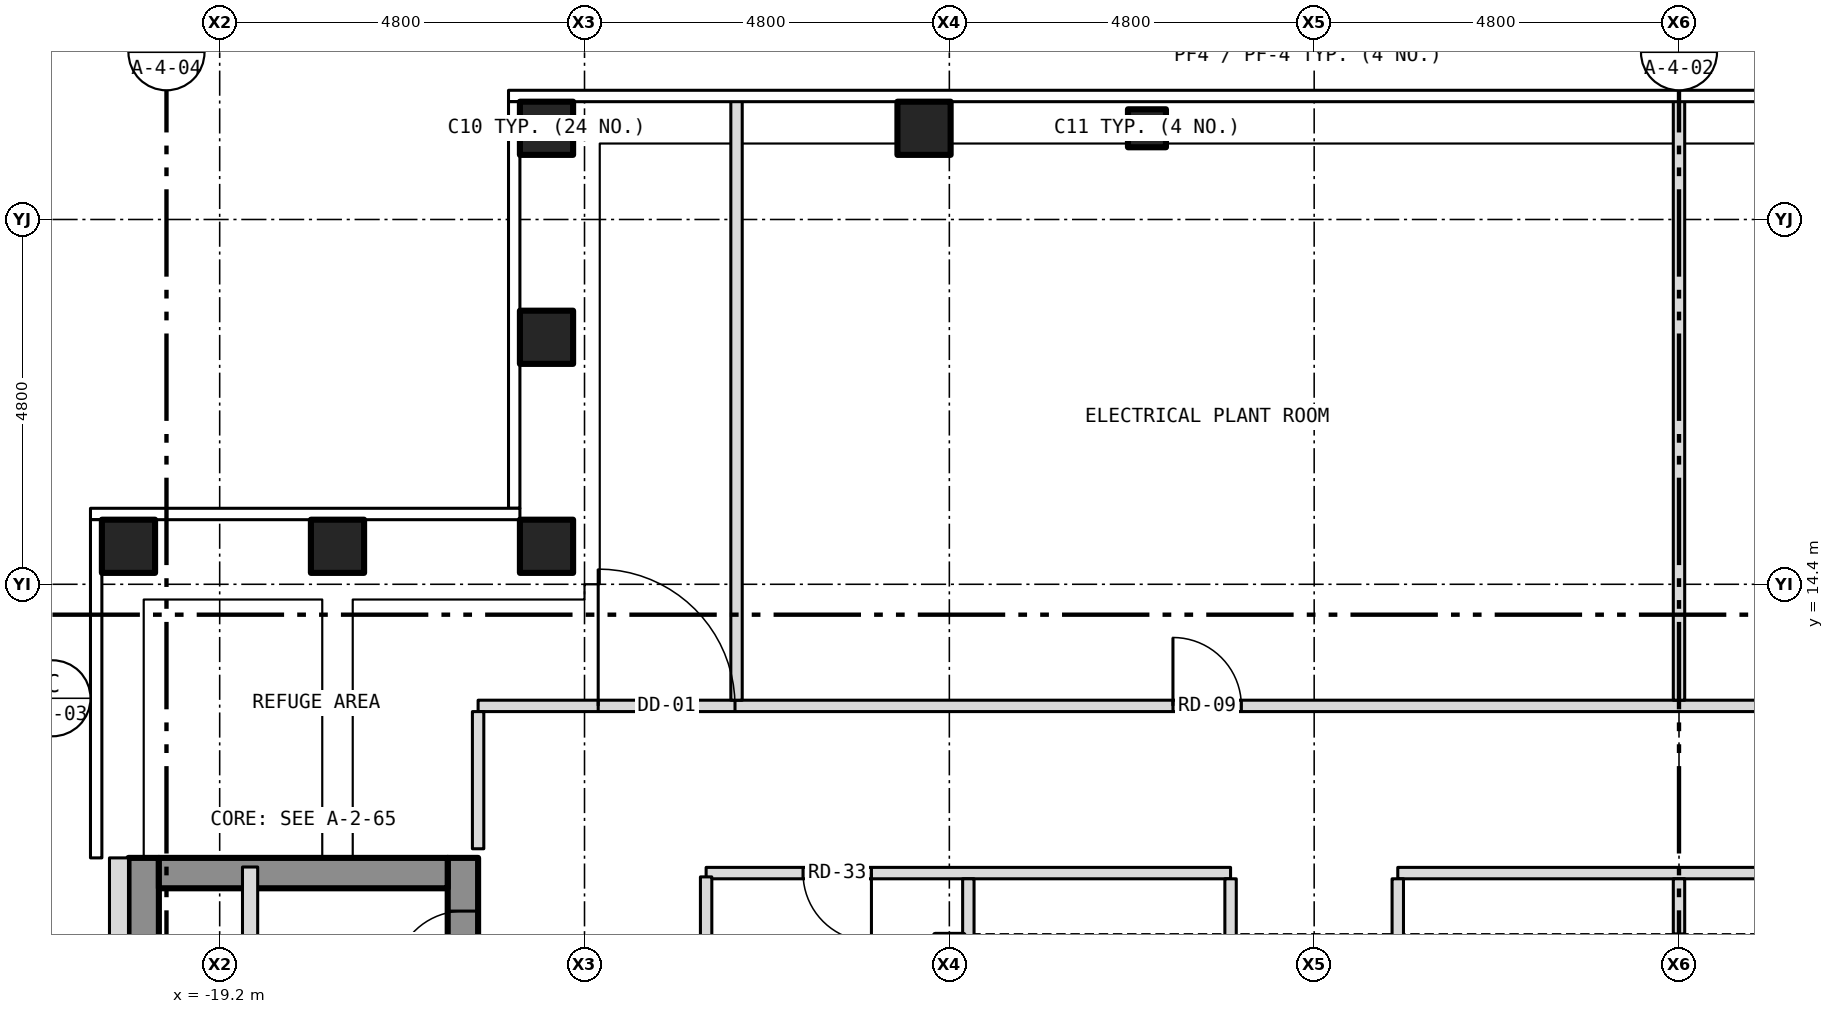
"""IFC4 building model, lengths in metres.
Left out: names, types, materials, properties, quantities, classifications, styles, units other than length and angle.
Written with IfcOpenShell. Run it as: python <this file> out.ifc"""

import sys

from ifc_helpers import new_model, si_unit, direction, frame, frame_2d, origin, origin_2d, place, context, subcontext, project, spatial, rectangle, hollow_rectangle, extrude, element, fill, save


model = new_model("IFC4")
c1 = context("Model", 3, precision=1e-05, world=origin(), true_north=direction((0.0, 1.0)))
c2 = subcontext(c1, "Body", "Model", "MODEL_VIEW")
j1 = project(units=[si_unit("LENGTHUNIT", "METRE"), si_unit("PLANEANGLEUNIT", "RADIAN")], contexts=[c1])
p1 = place(None, origin())
s1 = spatial("IfcSite", under=j1, at=p1, CompositionType="ELEMENT")
p2 = place(p1, origin())
s2 = spatial("IfcBuilding", under=s1, at=p2, CompositionType="ELEMENT")
p3 = place(p2, frame((0.0, 0.0, 236.5)))
s3 = spatial("IfcBuildingStorey", under=s2, at=p3, CompositionType="ELEMENT", Elevation=236.5)
for number, where, z_axis, x_axis in (
    (1, (-14.9, 20.4, -0.3), (0.0, 0.0, 1.0), (1.0, 0.0, 0.0)),
    (2, (-9.933, 20.4, -0.3), (0.0, 0.0, 1.0), (1.0, 0.0, 0.0)),
    (3, (-20.4, 14.9, -0.3), (0.0, 0.0, 1.0), (1.0, 0.0, 0.0)),
    (4, (-14.9, 14.9, -0.3), (0.0, 0.0, 1.0), (1.0, 0.0, 0.0)),
    (5, (-14.9, 17.65, -0.3), (0.0, 0.0, 1.0), (1.0, 0.0, 0.0)),
    (6, (-17.65, 14.9, -0.3), (0.0, 0.0, 1.0), (1.0, 0.0, 0.0)),
):
    element("IfcColumn", number, at=place(p3, frame(where, z_axis=z_axis, x_axis=x_axis)), inside=s3, PredefinedType="COLUMN", context=c2, shape_type="SweptSolid", body=[
        extrude(hollow_rectangle(XDim=0.7, YDim=0.7, WallThickness=0.04, at=origin_2d()), origin(), (0.0, 0.0, 1.0), 4.65),
    ])
p4 = place(p3, frame((-7.0, 20.4, -0.3), z_axis=(0.0, 0.0, 1.0), x_axis=(1.0, 0.0, 0.0)))
e7 = element("IfcColumn", 7, at=p4, inside=s3, PredefinedType="COLUMN", context=c2, shape_type="SweptSolid", body=[
    extrude(hollow_rectangle(XDim=0.5, YDim=0.5, WallThickness=0.03, at=origin_2d()), origin(), (0.0, 0.0, 1.0), 4.65),
])
p5 = place(p3, frame((-16.0, -10.8, 0.0), z_axis=(0.0, 0.0, 1.0), x_axis=(0.0, 1.0, 0.0)))
e8 = element("IfcWall", 8, at=p5, inside=s3, PredefinedType="SHEAR", context=c2, shape_type="SweptSolid", body=[
    extrude(rectangle(XDim=21.6, YDim=0.4, at=frame_2d((10.8, 0.0))), origin(), (0.0, 0.0, 1.0), 3.9),
])
p6 = place(p5, frame((9.4, 0.0, 0.0)))
e9 = element("IfcOpeningElement", 9, at=p6, cuts=e8, PredefinedType="OPENING", context=c2, shape_type="SweptSolid", body=[
    extrude(rectangle(XDim=1.1, YDim=2.1, at=frame_2d((0.55, 1.05))), frame((0.0, 0.212, 0.0), z_axis=(0.0, -1.0, 0.0), x_axis=(1.0, 0.0, 0.0)), (0.0, 0.0, 1.0), 0.424),
])
p7 = place(p5, frame((11.5, 0.0, 0.0)))
e10 = element("IfcOpeningElement", 10, at=p7, cuts=e8, PredefinedType="OPENING", context=c2, shape_type="SweptSolid", body=[
    extrude(rectangle(XDim=1.1, YDim=2.1, at=frame_2d((0.55, 1.05))), frame((0.0, 0.212, 0.0), z_axis=(0.0, -1.0, 0.0), x_axis=(1.0, 0.0, 0.0)), (0.0, 0.0, 1.0), 0.424),
])
p8 = place(p5, frame((13.6, 0.0, 0.0)))
e11 = element("IfcOpeningElement", 11, at=p8, cuts=e8, PredefinedType="OPENING", context=c2, shape_type="SweptSolid", body=[
    extrude(rectangle(XDim=1.1, YDim=2.1, at=frame_2d((0.55, 1.05))), frame((0.0, 0.212, 0.0), z_axis=(0.0, -1.0, 0.0), x_axis=(1.0, 0.0, 0.0)), (0.0, 0.0, 1.0), 0.424),
])
p9 = place(p5, frame((15.7, 0.0, 0.0)))
e12 = element("IfcOpeningElement", 12, at=p9, cuts=e8, PredefinedType="OPENING", context=c2, shape_type="SweptSolid", body=[
    extrude(rectangle(XDim=1.1, YDim=2.1, at=frame_2d((0.55, 1.05))), frame((0.0, 0.212, 0.0), z_axis=(0.0, -1.0, 0.0), x_axis=(1.0, 0.0, 0.0)), (0.0, 0.0, 1.0), 0.424),
])
p10 = place(p5, frame((17.8, 0.0, 0.0)))
e13 = element("IfcOpeningElement", 13, at=p10, cuts=e8, PredefinedType="OPENING", context=c2, shape_type="SweptSolid", body=[
    extrude(rectangle(XDim=1.1, YDim=2.1, at=frame_2d((0.55, 1.05))), frame((0.0, 0.212, 0.0), z_axis=(0.0, -1.0, 0.0), x_axis=(1.0, 0.0, 0.0)), (0.0, 0.0, 1.0), 0.424),
])
p11 = place(p5, frame((0.458, 0.0, 0.0)))
e14 = element("IfcOpeningElement", 14, at=p11, cuts=e8, PredefinedType="OPENING", context=c2, shape_type="SweptSolid", body=[
    extrude(rectangle(XDim=1.1, YDim=2.1, at=frame_2d((0.55, 1.05))), frame((0.0, 0.212, 0.0), z_axis=(0.0, -1.0, 0.0), x_axis=(1.0, 0.0, 0.0)), (0.0, 0.0, 1.0), 0.424),
])
p12 = place(p5, frame((7.5, 0.0, 0.0)))
e15 = element("IfcOpeningElement", 15, at=p12, cuts=e8, PredefinedType="OPENING", context=c2, shape_type="SweptSolid", body=[
    extrude(rectangle(XDim=1.1, YDim=2.1, at=frame_2d((0.55, 1.05))), frame((0.0, 0.212, 0.0), z_axis=(0.0, -1.0, 0.0), x_axis=(1.0, 0.0, 0.0)), (0.0, 0.0, 1.0), 0.424),
])
p13 = place(p5, frame((20.0, 0.0, 0.0)))
e16 = element("IfcOpeningElement", 16, at=p13, cuts=e8, PredefinedType="OPENING", context=c2, shape_type="SweptSolid", body=[
    extrude(rectangle(XDim=0.9, YDim=2.1, at=frame_2d((0.45, 1.05))), frame((0.0, 0.212, 0.0), z_axis=(0.0, -1.0, 0.0), x_axis=(1.0, 0.0, 0.0)), (0.0, 0.0, 1.0), 0.424),
])
p14 = place(p3, frame((-20.2, -10.8, 0.0), z_axis=(0.0, 0.0, 1.0), x_axis=(0.0, 1.0, 0.0)))
e17 = element("IfcWall", 17, at=p14, inside=s3, PredefinedType="SHEAR", context=c2, shape_type="SweptSolid", body=[
    extrude(rectangle(XDim=21.6, YDim=0.4, at=frame_2d((10.8, 0.0))), origin(), (0.0, 0.0, 1.0), 3.9),
])
p15 = place(p3, frame((-20.0, 10.6, 0.0), z_axis=(0.0, 0.0, 1.0), x_axis=(1.0, 0.0, 0.0)))
e18 = element("IfcWall", 18, at=p15, inside=s3, PredefinedType="SHEAR", context=c2, shape_type="SweptSolid", body=[
    extrude(rectangle(XDim=3.8, YDim=0.4, at=frame_2d((1.9, 0.0))), origin(), (0.0, 0.0, 1.0), 3.9),
])
p16 = place(p3, frame((-20.525, 10.8, 0.0), z_axis=(0.0, 0.0, 1.0), x_axis=(0.0, -1.0, 0.0)))
e19 = element("IfcWall", 19, at=p16, inside=s3, PredefinedType="SOLIDWALL", context=c2, shape_type="SweptSolid", body=[
    extrude(rectangle(XDim=21.6, YDim=0.25, at=frame_2d((10.8, 0.0))), origin(), (0.0, 0.0, 1.0), 4.5),
])
p17 = place(p16, frame((3.0, 0.0, 2.2)))
e20 = element("IfcOpeningElement", 20, at=p17, cuts=e19, PredefinedType="OPENING", context=c2, shape_type="SweptSolid", body=[
    extrude(rectangle(XDim=1.2, YDim=0.6, at=frame_2d((0.6, 0.3))), frame((0.0, 0.137, 0.0), z_axis=(0.0, -1.0, 0.0), x_axis=(1.0, 0.0, 0.0)), (0.0, 0.0, 1.0), 0.274),
])
p18 = place(p16, frame((7.8, 0.0, 2.2)))
e21 = element("IfcOpeningElement", 21, at=p18, cuts=e19, PredefinedType="OPENING", context=c2, shape_type="SweptSolid", body=[
    extrude(rectangle(XDim=1.2, YDim=0.6, at=frame_2d((0.6, 0.3))), frame((0.0, 0.137, 0.0), z_axis=(0.0, -1.0, 0.0), x_axis=(1.0, 0.0, 0.0)), (0.0, 0.0, 1.0), 0.274),
])
p19 = place(p16, frame((12.6, 0.0, 2.2)))
e22 = element("IfcOpeningElement", 22, at=p19, cuts=e19, PredefinedType="OPENING", context=c2, shape_type="SweptSolid", body=[
    extrude(rectangle(XDim=1.2, YDim=0.6, at=frame_2d((0.6, 0.3))), frame((0.0, 0.137, 0.0), z_axis=(0.0, -1.0, 0.0), x_axis=(1.0, 0.0, 0.0)), (0.0, 0.0, 1.0), 0.274),
])
p20 = place(p16, frame((17.4, 0.0, 2.2)))
e23 = element("IfcOpeningElement", 23, at=p20, cuts=e19, PredefinedType="OPENING", context=c2, shape_type="SweptSolid", body=[
    extrude(rectangle(XDim=1.2, YDim=0.6, at=frame_2d((0.6, 0.3))), frame((0.0, 0.137, 0.0), z_axis=(0.0, -1.0, 0.0), x_axis=(1.0, 0.0, 0.0)), (0.0, 0.0, 1.0), 0.274),
])
p21 = place(p3, frame((-12.8, 10.6, 0.0), z_axis=(0.0, 0.0, 1.0), x_axis=(1.0, 0.0, 0.0)))
e24 = element("IfcWall", 24, at=p21, inside=s3, PredefinedType="PARTITIONING", context=c2, shape_type="SweptSolid", body=[
    extrude(rectangle(XDim=6.9, YDim=0.15, at=frame_2d((3.45, 0.0))), origin(), (0.0, 0.0, 1.0), 4.35),
])
p22 = place(p21, frame((1.275, 0.0, 0.0)))
e25 = element("IfcOpeningElement", 25, at=p22, cuts=e24, PredefinedType="OPENING", context=c2, shape_type="SweptSolid", body=[
    extrude(rectangle(XDim=0.9, YDim=2.1, at=frame_2d((0.45, 1.05))), frame((0.0, 0.087, 0.0), z_axis=(0.0, -1.0, 0.0), x_axis=(1.0, 0.0, 0.0)), (0.0, 0.0, 1.0), 0.174),
])
p23 = place(p3, frame((-3.7, 10.6, 0.0), z_axis=(0.0, 0.0, 1.0), x_axis=(1.0, 0.0, 0.0)))
e26 = element("IfcWall", 26, at=p23, inside=s3, PredefinedType="PARTITIONING", context=c2, shape_type="SweptSolid", body=[
    extrude(rectangle(XDim=7.4, YDim=0.15, at=frame_2d((3.7, 0.0))), origin(), (0.0, 0.0, 1.0), 4.35),
])
p24 = place(p3, frame((-15.8, 12.8, 0.0), z_axis=(0.0, 0.0, 1.0), x_axis=(1.0, 0.0, 0.0)))
e27 = element("IfcWall", 27, at=p24, inside=s3, PredefinedType="PARTITIONING", context=c2, shape_type="SweptSolid", body=[
    extrude(rectangle(XDim=31.6, YDim=0.15, at=frame_2d((15.8, 0.0))), origin(), (0.0, 0.0, 1.0), 4.35),
])
p25 = place(p24, frame((9.142, 0.0, 0.0)))
e28 = element("IfcOpeningElement", 28, at=p25, cuts=e27, PredefinedType="OPENING", context=c2, shape_type="SweptSolid", body=[
    extrude(rectangle(XDim=0.9, YDim=2.1, at=frame_2d((0.45, 1.05))), frame((0.0, 0.087, 0.0), z_axis=(0.0, -1.0, 0.0), x_axis=(1.0, 0.0, 0.0)), (0.0, 0.0, 1.0), 0.174),
])
p26 = place(p24, frame((21.559, 0.0, 0.0)))
e29 = element("IfcOpeningElement", 29, at=p26, cuts=e27, PredefinedType="OPENING", context=c2, shape_type="SweptSolid", body=[
    extrude(rectangle(XDim=0.9, YDim=2.1, at=frame_2d((0.45, 1.05))), frame((0.0, 0.087, 0.0), z_axis=(0.0, -1.0, 0.0), x_axis=(1.0, 0.0, 0.0)), (0.0, 0.0, 1.0), 0.174),
])
p27 = place(p24, frame((1.58, 0.0, 0.0)))
e30 = element("IfcOpeningElement", 30, at=p27, cuts=e27, PredefinedType="OPENING", context=c2, shape_type="SweptSolid", body=[
    extrude(rectangle(XDim=1.8, YDim=2.1, at=frame_2d((0.9, 1.05))), frame((0.0, 0.087, 0.0), z_axis=(0.0, -1.0, 0.0), x_axis=(1.0, 0.0, 0.0)), (0.0, 0.0, 1.0), 0.174),
])
p28 = place(p24, frame((28.23, 0.0, 0.0)))
e31 = element("IfcOpeningElement", 31, at=p28, cuts=e27, PredefinedType="OPENING", context=c2, shape_type="SweptSolid", body=[
    extrude(rectangle(XDim=1.8, YDim=2.1, at=frame_2d((0.9, 1.05))), frame((0.0, 0.087, 0.0), z_axis=(0.0, -1.0, 0.0), x_axis=(1.0, 0.0, 0.0)), (0.0, 0.0, 1.0), 0.174),
])
p29 = place(p3, frame((-18.8, -1.8, 0.0), z_axis=(0.0, 0.0, 1.0), x_axis=(0.0, 1.0, 0.0)))
e32 = element("IfcWall", 32, at=p29, inside=s3, PredefinedType="PARTITIONING", context=c2, shape_type="SweptSolid", body=[
    extrude(rectangle(XDim=12.48, YDim=0.2, at=frame_2d((6.24, 0.0))), origin(), (0.0, 0.0, 1.0), 3.9),
])
p30 = place(p3, frame((-15.8, 10.92, 0.0), z_axis=(0.0, 0.0, 1.0), x_axis=(0.0, 1.0, 0.0)))
e33 = element("IfcWall", 33, at=p30, inside=s3, PredefinedType="PARTITIONING", context=c2, shape_type="SweptSolid", body=[
    extrude(rectangle(XDim=1.805, YDim=0.15, at=frame_2d((0.903, 0.0))), origin(), (0.0, 0.0, 1.0), 4.35),
])
p31 = place(p3, frame((-12.8, 5.95, 0.0), z_axis=(0.0, 0.0, 1.0), x_axis=(0.0, 1.0, 0.0)))
e34 = element("IfcWall", 34, at=p31, inside=s3, PredefinedType="PARTITIONING", context=c2, shape_type="SweptSolid", body=[
    extrude(rectangle(XDim=4.6, YDim=0.15, at=frame_2d((2.3, 0.0))), origin(), (0.0, 0.0, 1.0), 4.35),
])
p32 = place(p3, frame((-12.4, 12.875, 0.0), z_axis=(0.0, 0.0, 1.0), x_axis=(0.0, 1.0, 0.0)))
e35 = element("IfcWall", 35, at=p32, inside=s3, PredefinedType="PARTITIONING", context=c2, shape_type="SweptSolid", body=[
    extrude(rectangle(XDim=7.905, YDim=0.15, at=frame_2d((3.953, 0.0))), origin(), (0.0, 0.0, 1.0), 4.35),
])
p33 = place(p3, frame((-9.35, 5.975, 0.0), z_axis=(0.0, 0.0, 1.0), x_axis=(0.0, 1.0, 0.0)))
e36 = element("IfcWall", 36, at=p33, inside=s3, PredefinedType="PARTITIONING", context=c2, shape_type="SweptSolid", body=[
    extrude(rectangle(XDim=4.55, YDim=0.15, at=frame_2d((2.275, 0.0))), origin(), (0.0, 0.0, 1.0), 4.35),
])
p34 = place(p3, frame((-5.9, 5.975, 0.0), z_axis=(0.0, 0.0, 1.0), x_axis=(0.0, 1.0, 0.0)))
e37 = element("IfcWall", 37, at=p34, inside=s3, PredefinedType="PARTITIONING", context=c2, shape_type="SweptSolid", body=[
    extrude(rectangle(XDim=4.55, YDim=0.15, at=frame_2d((2.275, 0.0))), origin(), (0.0, 0.0, 1.0), 4.35),
])
p35 = place(p34, frame((1.825, 0.0, 0.0)))
e38 = element("IfcOpeningElement", 38, at=p35, cuts=e37, PredefinedType="OPENING", context=c2, shape_type="SweptSolid", body=[
    extrude(rectangle(XDim=0.9, YDim=2.1, at=frame_2d((0.45, 1.05))), frame((0.0, 0.087, 0.0), z_axis=(0.0, -1.0, 0.0), x_axis=(1.0, 0.0, 0.0)), (0.0, 0.0, 1.0), 0.174),
])
p36 = place(p3, frame((-3.7, 5.975, 0.0), z_axis=(0.0, 0.0, 1.0), x_axis=(0.0, 1.0, 0.0)))
e39 = element("IfcWall", 39, at=p36, inside=s3, PredefinedType="PARTITIONING", context=c2, shape_type="SweptSolid", body=[
    extrude(rectangle(XDim=4.55, YDim=0.15, at=frame_2d((2.275, 0.0))), origin(), (0.0, 0.0, 1.0), 4.35),
])
p37 = place(p36, frame((1.825, 0.0, 0.0)))
e40 = element("IfcOpeningElement", 40, at=p37, cuts=e39, PredefinedType="OPENING", context=c2, shape_type="SweptSolid", body=[
    extrude(rectangle(XDim=0.9, YDim=2.1, at=frame_2d((0.45, 1.05))), frame((0.0, 0.087, 0.0), z_axis=(0.0, -1.0, 0.0), x_axis=(1.0, 0.0, 0.0)), (0.0, 0.0, 1.0), 0.174),
])
p38 = place(p3, frame((0.0, 9.399, 0.0), z_axis=(0.0, 0.0, 1.0), x_axis=(0.0, 1.0, 0.0)))
e41 = element("IfcWall", 41, at=p38, inside=s3, PredefinedType="PARTITIONING", context=c2, shape_type="SweptSolid", body=[
    extrude(rectangle(XDim=0.401, YDim=0.15, at=frame_2d((0.201, 0.0))), origin(), (0.0, 0.0, 1.0), 4.35),
])
p39 = place(p3, frame((0.0, 9.8, 0.0), z_axis=(0.0, 0.0, 1.0), x_axis=(0.0, 1.0, 0.0)))
e42 = element("IfcWall", 42, at=p39, inside=s3, PredefinedType="PARTITIONING", context=c2, shape_type="SweptSolid", body=[
    extrude(rectangle(XDim=0.725, YDim=0.15, at=frame_2d((0.362, 0.0))), origin(), (0.0, 0.0, 1.0), 3.728),
])
p40 = place(p3, frame((0.0, 12.875, 0.0), z_axis=(0.0, 0.0, 1.0), x_axis=(0.0, 1.0, 0.0)))
e43 = element("IfcWall", 43, at=p40, inside=s3, PredefinedType="PARTITIONING", context=c2, shape_type="SweptSolid", body=[
    extrude(rectangle(XDim=7.905, YDim=0.15, at=frame_2d((3.953, 0.0))), origin(), (0.0, 0.0, 1.0), 3.728),
])
p41 = place(p13, origin())
e44 = element("IfcDoor", 44, at=p41, inside=s3, OperationType="SINGLE_SWING_LEFT", PredefinedType="DOOR", context=c2, shape_type="SweptSolid", body=[
    extrude(rectangle(XDim=0.9, YDim=2.1, at=frame_2d((0.45, 1.05))), frame((0.0, 0.025, 0.0), z_axis=(0.0, -1.0, 0.0), x_axis=(1.0, 0.0, 0.0)), (0.0, 0.0, 1.0), 0.05),
])
fill(e16, e44)
p42 = place(p25, origin())
e45 = element("IfcDoor", 45, at=p42, inside=s3, OperationType="SINGLE_SWING_LEFT", PredefinedType="DOOR", context=c2, shape_type="SweptSolid", body=[
    extrude(rectangle(XDim=0.9, YDim=2.1, at=frame_2d((0.45, 1.05))), frame((0.0, 0.025, 0.0), z_axis=(0.0, -1.0, 0.0), x_axis=(1.0, 0.0, 0.0)), (0.0, 0.0, 1.0), 0.05),
])
fill(e28, e45)
p43 = place(p27, origin())
e46 = element("IfcDoor", 46, at=p43, inside=s3, OperationType="DOUBLE_DOOR_SINGLE_SWING", PredefinedType="DOOR", context=c2, shape_type="SweptSolid", body=[
    extrude(rectangle(XDim=1.8, YDim=2.1, at=frame_2d((0.9, 1.05))), frame((0.0, 0.025, 0.0), z_axis=(0.0, -1.0, 0.0), x_axis=(1.0, 0.0, 0.0)), (0.0, 0.0, 1.0), 0.05),
])
fill(e30, e46)
p44 = place(p22, origin())
e47 = element("IfcDoor", 47, at=p44, inside=s3, OperationType="SINGLE_SWING_RIGHT", PredefinedType="DOOR", context=c2, shape_type="SweptSolid", body=[
    extrude(rectangle(XDim=0.9, YDim=2.1, at=frame_2d((0.45, 1.05))), frame((0.0, 0.025, 0.0), z_axis=(0.0, -1.0, 0.0), x_axis=(1.0, 0.0, 0.0)), (0.0, 0.0, 1.0), 0.05),
])
fill(e25, e47)
save(model, sys.argv[1])
